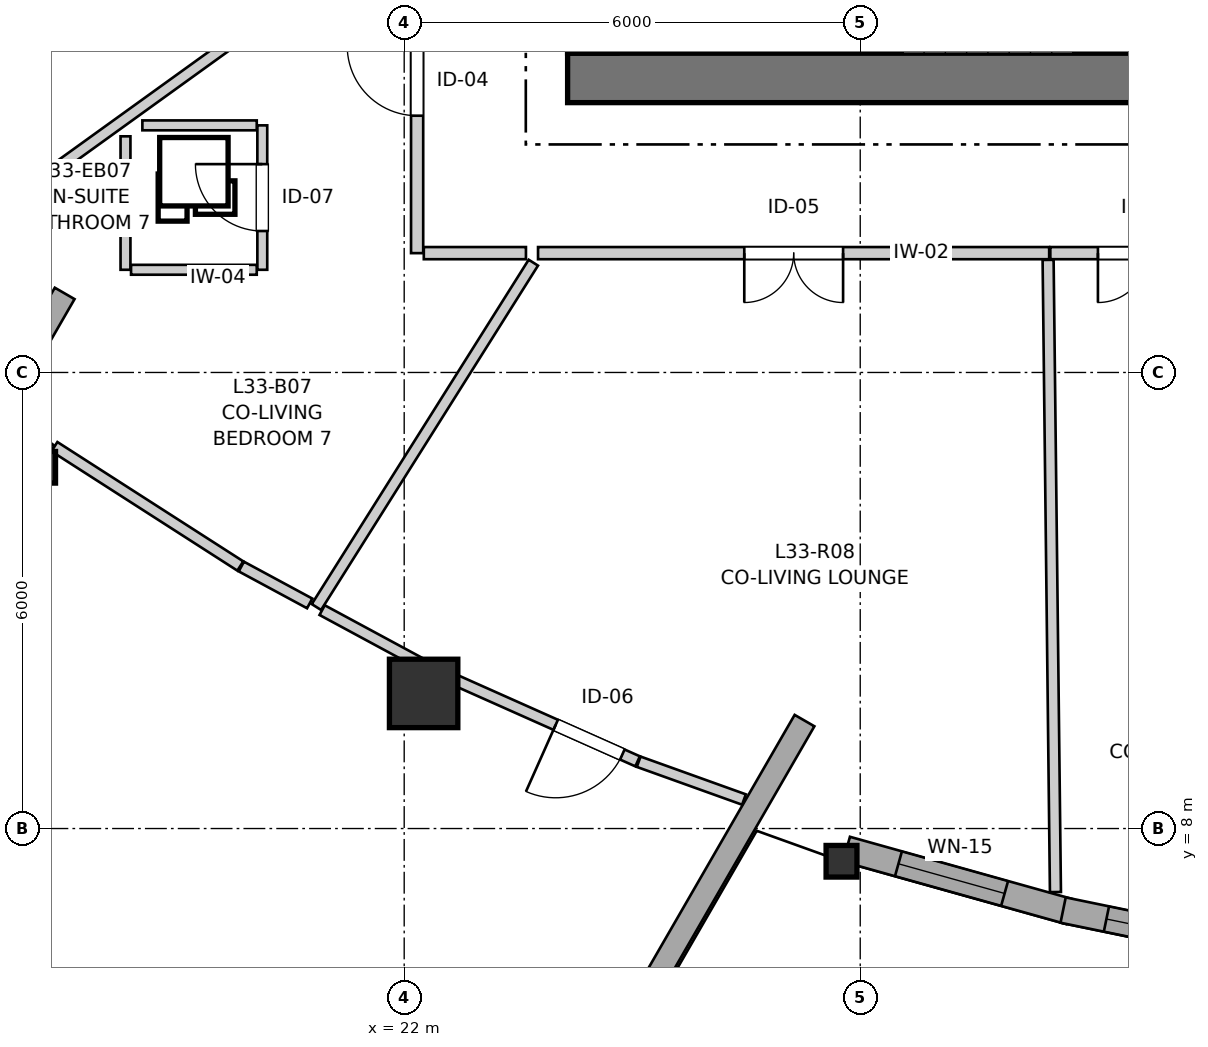
"""IFC4 building model, lengths in metres.
Left out: names, types, materials, properties, quantities, classifications, styles, units other than length and angle.
Written with IfcOpenShell. Run it as: python <this file> out.ifc"""

import sys

from ifc_helpers import new_model, si_unit, direction, frame, frame_2d, origin, origin_2d, place, context, subcontext, project, spatial, rectangle, i_section, extrude, source, transform, mapped, element, fill, save


model = new_model("IFC4")
c1 = context("Model", 3, precision=1e-05, world=origin(), true_north=direction((0.0, 1.0)))
c2 = subcontext(c1, "Body", "Model", "MODEL_VIEW")
j1 = project(units=[si_unit("LENGTHUNIT", "METRE"), si_unit("PLANEANGLEUNIT", "RADIAN")], contexts=[c1])
p1 = place(None, origin())
s1 = spatial("IfcSite", under=j1, at=p1, CompositionType="ELEMENT")
p2 = place(p1, origin())
s2 = spatial("IfcBuilding", under=s1, at=p2, CompositionType="ELEMENT")
p3 = place(p2, frame((0.0, 0.0, 112.0)))
s3 = spatial("IfcBuildingStorey", under=s2, at=p3, CompositionType="ELEMENT", Elevation=112.0)
p4 = place(p3, frame((24.15, 17.875, 0.0), z_axis=(0.0, 0.0, 1.0), x_axis=(1.0, 0.0, 0.0)))
e1 = element("IfcWall", 1, at=p4, inside=s3, PredefinedType="SHEAR", context=c2, shape_type="SweptSolid", body=[
    extrude(rectangle(XDim=12.4, YDim=0.65, at=frame_2d((6.2, 0.0))), origin(), (0.0, 0.0, 1.0), 2.935),
])
p5 = place(p3, frame((24.475, 33.8, 0.0), z_axis=(0.0, 0.0, 1.0), x_axis=(0.0, -1.0, 0.0)))
e2 = element("IfcWall", 2, at=p5, inside=s3, PredefinedType="SHEAR", context=c2, shape_type="SweptSolid", body=[
    extrude(rectangle(XDim=15.6, YDim=0.65, at=frame_2d((7.8, 0.0))), origin(), (0.0, 0.0, 1.0), 2.935),
])
p6 = place(p5, frame((7.05, 0.0, 0.0)))
e3 = element("IfcOpeningElement", 3, at=p6, cuts=e2, PredefinedType="OPENING", context=c2, shape_type="SweptSolid", body=[
    extrude(rectangle(XDim=1.5, YDim=2.15, at=frame_2d((0.75, 1.075))), frame((0.0, 0.335, 0.0), z_axis=(0.0, -1.0, 0.0), x_axis=(1.0, 0.0, 0.0)), (0.0, 0.0, 1.0), 0.67),
])
p7 = place(p5, frame((3.52, 0.0, 0.0)))
e4 = element("IfcOpeningElement", 4, at=p7, cuts=e2, PredefinedType="OPENING", context=c2, shape_type="SweptSolid", body=[
    extrude(rectangle(XDim=0.86, YDim=2.05, at=frame_2d((0.43, 1.025))), frame((0.0, 0.335, 0.0), z_axis=(0.0, -1.0, 0.0), x_axis=(1.0, 0.0, 0.0)), (0.0, 0.0, 1.0), 0.67),
])
p8 = place(p5, frame((11.22, 0.0, 0.0)))
e5 = element("IfcOpeningElement", 5, at=p8, cuts=e2, PredefinedType="OPENING", context=c2, shape_type="SweptSolid", body=[
    extrude(rectangle(XDim=0.86, YDim=2.05, at=frame_2d((0.43, 1.025))), frame((0.0, 0.335, 0.0), z_axis=(0.0, -1.0, 0.0), x_axis=(1.0, 0.0, 0.0)), (0.0, 0.0, 1.0), 0.67),
])
m1 = source(origin(), c2, "Body", "SweptSolid", [
    extrude(i_section(OverallWidth=0.406, OverallDepth=0.416, WebThickness=0.027, FlangeThickness=0.044, FilletRadius=0.015, at=origin_2d()), origin(), (0.0, 0.0, 1.0), 2.935),
])
p9 = place(p3, frame((17.209, 12.753, 0.0), z_axis=(0.0, 0.0, 1.0), x_axis=(1.0, 0.0, 0.0)))
e6 = element("IfcColumn", 6, at=p9, inside=s3, PredefinedType="PILASTER", context=c2, shape_type="MappedRepresentation", body=[
    mapped(m1, transform((0.0, 0.0, 0.0), x_axis=(1.0, 0.0, 0.0), y_axis=(0.0, 1.0, 0.0), z_axis=(0.0, 0.0, 1.0), scale=1.0)),
])
m2 = source(origin(), c2, "Body", "SweptSolid", [
    extrude(rectangle(XDim=0.9, YDim=0.9, at=origin_2d()), origin(), (0.0, 0.0, 1.0), 2.935),
])
p10 = place(p3, frame((22.256, 9.778, 0.0), z_axis=(0.0, 0.0, 1.0), x_axis=(1.0, 0.0, 0.0)))
e7 = element("IfcColumn", 7, at=p10, inside=s3, PredefinedType="COLUMN", context=c2, shape_type="MappedRepresentation", body=[
    mapped(m2, transform((0.0, 0.0, 0.0), x_axis=(1.0, 0.0, 0.0), y_axis=(0.0, 1.0, 0.0), z_axis=(0.0, 0.0, 1.0), scale=1.0)),
])
p11 = place(p3, frame((27.754, 7.569, 0.0), z_axis=(0.0, 0.0, 1.0), x_axis=(1.0, 0.0, 0.0)))
e8 = element("IfcColumn", 8, at=p11, inside=s3, PredefinedType="PILASTER", context=c2, shape_type="MappedRepresentation", body=[
    mapped(m1, transform((0.0, 0.0, 0.0), x_axis=(1.0, 0.0, 0.0), y_axis=(0.0, 1.0, 0.0), z_axis=(0.0, 0.0, 1.0), scale=1.0)),
])
p12 = place(p3, frame((14.928, 14.686, 0.0), z_axis=(0.0, 0.0, 1.0), x_axis=(0.798387010211, -0.602144651995, 0.0)))
e9 = element("IfcWall", 9, at=p12, inside=s3, PredefinedType="SOLIDWALL", context=c2, shape_type="SweptSolid", body=[
    extrude(rectangle(XDim=2.966, YDim=0.34, at=frame_2d((1.483, 0.0))), origin(), (0.0, 0.0, 1.0), 2.465),
])
p13 = place(p12, frame((0.891, 0.0, 0.82)))
e10 = element("IfcOpeningElement", 10, at=p13, cuts=e9, PredefinedType="OPENING", context=c2, shape_type="SweptSolid", body=[
    extrude(rectangle(XDim=0.58, YDim=1.35, at=frame_2d((0.29, 0.675))), frame((0.0, 0.18, 0.0), z_axis=(0.0, -1.0, 0.0), x_axis=(1.0, 0.0, 0.0)), (0.0, 0.0, 1.0), 0.36),
])
p14 = place(p3, frame((27.819, 7.728, 0.0), z_axis=(0.0, 0.0, 1.0), x_axis=(0.963032186905, -0.269386352632, 0.0)))
e11 = element("IfcWall", 11, at=p14, inside=s3, PredefinedType="SOLIDWALL", context=c2, shape_type="SweptSolid", body=[
    extrude(rectangle(XDim=3.049, YDim=0.34, at=frame_2d((1.524, 0.0))), origin(), (0.0, 0.0, 1.0), 2.465),
])
p15 = place(p14, frame((0.71, 0.0, 0.82)))
e12 = element("IfcOpeningElement", 12, at=p15, cuts=e11, PredefinedType="OPENING", context=c2, shape_type="SweptSolid", body=[
    extrude(rectangle(XDim=1.45, YDim=1.25, at=frame_2d((0.725, 0.625))), frame((0.0, 0.18, 0.0), z_axis=(0.0, -1.0, 0.0), x_axis=(1.0, 0.0, 0.0)), (0.0, 0.0, 1.0), 0.36),
])
p16 = place(p3, frame((30.67, 6.927, 0.0), z_axis=(0.0, 0.0, 1.0), x_axis=(0.979422345081, -0.201821381317, 0.0)))
e13 = element("IfcWall", 13, at=p16, inside=s3, PredefinedType="SOLIDWALL", context=c2, shape_type="SweptSolid", body=[
    extrude(rectangle(XDim=2.903, YDim=0.34, at=frame_2d((1.452, 0.0))), origin(), (0.0, 0.0, 1.0), 2.465),
])
p17 = place(p16, frame((0.582, 0.0, 0.82)))
e14 = element("IfcOpeningElement", 14, at=p17, cuts=e13, PredefinedType="OPENING", context=c2, shape_type="SweptSolid", body=[
    extrude(rectangle(XDim=1.75, YDim=1.3, at=frame_2d((0.875, 0.65))), frame((0.0, 0.18, 0.0), z_axis=(0.0, -1.0, 0.0), x_axis=(1.0, 0.0, 0.0)), (0.0, 0.0, 1.0), 0.36),
])
p18 = place(p3, frame((27.267, 9.42, 0.0), z_axis=(0.0, 0.0, 1.0), x_axis=(-0.500001212782, -0.866024703583, 0.0)))
e15 = element("IfcWall", 15, at=p18, inside=s3, PredefinedType="SOLIDWALL", context=c2, shape_type="SweptSolid", body=[
    extrude(rectangle(XDim=20.09, YDim=0.3, at=frame_2d((10.045, 0.0))), origin(), (0.0, 0.0, 1.0), 2.115),
])
p19 = place(p3, frame((17.533, 15.04, 0.0), z_axis=(0.0, 0.0, 1.0), x_axis=(-0.499995950774, -0.866027741594, 0.0)))
e16 = element("IfcWall", 16, at=p19, inside=s3, PredefinedType="SOLIDWALL", context=c2, shape_type="SweptSolid", body=[
    extrude(rectangle(XDim=20.091, YDim=0.3, at=frame_2d((10.045, 0.0))), origin(), (0.0, 0.0, 1.0), 2.115),
])
p20 = place(p3, frame((30.486, 15.57, 0.0), z_axis=(0.0, 0.0, 1.0), x_axis=(-1.0, 0.0, 0.0)))
e17 = element("IfcWall", 17, at=p20, inside=s3, PredefinedType="PARTITIONING", context=c2, shape_type="SweptSolid", body=[
    extrude(rectangle(XDim=6.725, YDim=0.16, at=frame_2d((3.363, 0.0))), origin(), (0.0, 0.0, 1.0), 2.935),
])
p21 = place(p20, frame((2.711, 0.0, 0.0)))
e18 = element("IfcOpeningElement", 18, at=p21, cuts=e17, PredefinedType="OPENING", context=c2, shape_type="SweptSolid", body=[
    extrude(rectangle(XDim=1.3, YDim=2.1, at=frame_2d((0.65, 1.05))), frame((0.0, 0.09, 0.0), z_axis=(0.0, -1.0, 0.0), x_axis=(1.0, 0.0, 0.0)), (0.0, 0.0, 1.0), 0.18),
])
p22 = place(p3, frame((22.17, 15.57, 0.0), z_axis=(0.0, 0.0, 1.0), x_axis=(0.0, 1.0, 0.0)))
e19 = element("IfcWall", 19, at=p22, inside=s3, PredefinedType="PARTITIONING", context=c2, shape_type="SweptSolid", body=[
    extrude(rectangle(XDim=4.555, YDim=0.16, at=frame_2d((2.277, 0.0))), origin(), (0.0, 0.0, 1.0), 2.935),
])
p23 = place(p22, frame((1.808, 0.0, 0.0)))
e20 = element("IfcOpeningElement", 20, at=p23, cuts=e19, PredefinedType="OPENING", context=c2, shape_type="SweptSolid", body=[
    extrude(rectangle(XDim=0.92, YDim=2.1, at=frame_2d((0.46, 1.05))), frame((0.0, 0.09, 0.0), z_axis=(0.0, -1.0, 0.0), x_axis=(1.0, 0.0, 0.0)), (0.0, 0.0, 1.0), 0.18),
])
p24 = place(p3, frame((25.071, 8.884, 0.0), z_axis=(0.0, 0.0, 1.0), x_axis=(-0.913404708383, 0.407052623997, 0.0)))
e21 = element("IfcWall", 21, at=p24, inside=s3, PredefinedType="PARTITIONING", context=c2, shape_type="SweptSolid", body=[
    extrude(rectangle(XDim=2.923, YDim=0.145, at=frame_2d((1.462, 0.0))), origin(), (0.0, 0.0, 1.0), 2.453),
])
p25 = place(p24, frame((0.22, 0.0, 0.0)))
e22 = element("IfcOpeningElement", 22, at=p25, cuts=e21, PredefinedType="OPENING", context=c2, shape_type="SweptSolid", body=[
    extrude(rectangle(XDim=0.96, YDim=2.1, at=frame_2d((0.48, 1.05))), frame((0.0, 0.083, 0.0), z_axis=(0.0, -1.0, 0.0), x_axis=(1.0, 0.0, 0.0)), (0.0, 0.0, 1.0), 0.165),
])
p26 = place(p3, frame((33.099, 15.57, 0.0), z_axis=(0.0, 0.0, 1.0), x_axis=(-1.0, 0.0, 0.0)))
e23 = element("IfcWall", 23, at=p26, inside=s3, PredefinedType="PARTITIONING", context=c2, shape_type="SweptSolid", body=[
    extrude(rectangle(XDim=2.598, YDim=0.16, at=frame_2d((1.299, 0.0))), origin(), (0.0, 0.0, 1.0), 2.935),
])
p27 = place(p26, frame((0.671, 0.0, 0.0)))
e24 = element("IfcOpeningElement", 24, at=p27, cuts=e23, PredefinedType="OPENING", context=c2, shape_type="SweptSolid", body=[
    extrude(rectangle(XDim=1.3, YDim=2.1, at=frame_2d((0.65, 1.05))), frame((0.0, 0.09, 0.0), z_axis=(0.0, -1.0, 0.0), x_axis=(1.0, 0.0, 0.0)), (0.0, 0.0, 1.0), 0.18),
])
p28 = place(p3, frame((20.133, 15.351, 0.0), z_axis=(0.0, 0.0, 1.0), x_axis=(0.0, 1.0, 0.0)))
e25 = element("IfcWall", 25, at=p28, inside=s3, PredefinedType="PARTITIONING", context=c2, shape_type="SweptSolid", body=[
    extrude(rectangle(XDim=1.9, YDim=0.13, at=frame_2d((0.95, 0.0))), origin(), (0.0, 0.0, 1.0), 2.935),
])
p29 = place(p28, frame((0.51, 0.0, 0.0)))
e26 = element("IfcOpeningElement", 26, at=p29, cuts=e25, PredefinedType="OPENING", context=c2, shape_type="SweptSolid", body=[
    extrude(rectangle(XDim=0.88, YDim=2.05, at=frame_2d((0.44, 1.025))), frame((0.0, 0.075, 0.0), z_axis=(0.0, -1.0, 0.0), x_axis=(1.0, 0.0, 0.0)), (0.0, 0.0, 1.0), 0.15),
])
p30 = place(p3, frame((14.966, 14.915, 0.0), z_axis=(0.0, 0.0, 1.0), x_axis=(0.811310715309, 0.584615192434, 0.0)))
e27 = element("IfcWall", 27, at=p30, inside=s3, PredefinedType="PARTITIONING", context=c2, shape_type="SweptSolid", body=[
    extrude(rectangle(XDim=8.72, YDim=0.145, at=frame_2d((4.36, 0.0))), origin(), (0.0, 0.0, 1.0), 2.103),
])
p31 = place(p3, frame((30.472, 15.481, 0.0), z_axis=(0.0, 0.0, 1.0), x_axis=(0.011623708307, -0.999932442421, 0.0)))
e28 = element("IfcWall", 28, at=p31, inside=s3, PredefinedType="PARTITIONING", context=c2, shape_type="SweptSolid", body=[
    extrude(rectangle(XDim=8.317, YDim=0.145, at=frame_2d((4.159, 0.0))), origin(), (0.0, 0.0, 1.0), 2.935),
])
p32 = place(p3, frame((20.845, 10.914, 0.0), z_axis=(0.0, 0.0, 1.0), x_axis=(0.533007953382, 0.846110230189, 0.0)))
e29 = element("IfcWall", 29, at=p32, inside=s3, PredefinedType="PARTITIONING", context=c2, shape_type="SweptSolid", body=[
    extrude(rectangle(XDim=5.354, YDim=0.145, at=frame_2d((2.677, 0.0))), origin(), (0.0, 0.0, 1.0), 2.935),
])
p33 = place(p3, frame((17.398, 13.024, 0.0), z_axis=(0.0, 0.0, 1.0), x_axis=(0.841590343852, -0.540116369994, 0.0)))
e30 = element("IfcWall", 30, at=p33, inside=s3, PredefinedType="PARTITIONING", context=c2, shape_type="SweptSolid", body=[
    extrude(rectangle(XDim=2.906, YDim=0.145, at=frame_2d((1.453, 0.0))), origin(), (0.0, 0.0, 1.0), 2.453),
])
p34 = place(p3, frame((18.333, 15.351, 0.0), z_axis=(0.0, 0.0, 1.0), x_axis=(0.0, 1.0, 0.0)))
e31 = element("IfcWall", 31, at=p34, inside=s3, PredefinedType="PARTITIONING", context=c2, shape_type="SweptSolid", body=[
    extrude(rectangle(XDim=1.756, YDim=0.13, at=frame_2d((0.878, 0.0))), origin(), (0.0, 0.0, 1.0), 2.935),
])
p35 = place(p3, frame((18.555, 17.251, 0.0), z_axis=(0.0, 0.0, 1.0), x_axis=(1.0, 0.0, 0.0)))
e32 = element("IfcWall", 32, at=p35, inside=s3, PredefinedType="PARTITIONING", context=c2, shape_type="SweptSolid", body=[
    extrude(rectangle(XDim=1.505, YDim=0.13, at=frame_2d((0.752, 0.0))), origin(), (0.0, 0.0, 1.0), 2.935),
])
p36 = place(p3, frame((18.406, 15.351, 0.0), z_axis=(0.0, 0.0, 1.0), x_axis=(1.0, 0.0, 0.0)))
e33 = element("IfcWall", 33, at=p36, inside=s3, PredefinedType="PARTITIONING", context=c2, shape_type="SweptSolid", body=[
    extrude(rectangle(XDim=1.654, YDim=0.13, at=frame_2d((0.827, 0.0))), origin(), (0.0, 0.0, 1.0), 2.935),
])
p37 = place(p3, frame((20.92, 10.873, 0.0), z_axis=(0.0, 0.0, 1.0), x_axis=(0.879929881444, -0.475103571595, 0.0)))
e34 = element("IfcWall", 34, at=p37, inside=s3, PredefinedType="PARTITIONING", context=c2, shape_type="SweptSolid", body=[
    extrude(rectangle(XDim=1.667, YDim=0.145, at=frame_2d((0.834, 0.0))), origin(), (0.0, 0.0, 1.0), 2.453),
])
p38 = place(p3, frame((22.258, 15.57, 0.0), z_axis=(0.0, 0.0, 1.0), x_axis=(1.0, 0.0, 0.0)))
e35 = element("IfcWall", 35, at=p38, inside=s3, PredefinedType="PARTITIONING", context=c2, shape_type="SweptSolid", body=[
    extrude(rectangle(XDim=1.344, YDim=0.16, at=frame_2d((0.672, 0.0))), origin(), (0.0, 0.0, 1.0), 2.935),
])
p39 = place(p3, frame((25.085, 8.879, 0.0), z_axis=(0.0, 0.0, 1.0), x_axis=(0.941166260093, -0.337943887151, 0.0)))
e36 = element("IfcWall", 36, at=p39, inside=s3, PredefinedType="PARTITIONING", context=c2, shape_type="SweptSolid", body=[
    extrude(rectangle(XDim=1.472, YDim=0.145, at=frame_2d((0.736, 0.0))), origin(), (0.0, 0.0, 1.0), 2.453),
])
p40 = place(p3, frame((19.857, 11.447, 0.0), z_axis=(0.0, 0.0, 1.0), x_axis=(0.8800411893, -0.474897362738, 0.0)))
e37 = element("IfcWall", 37, at=p40, inside=s3, PredefinedType="PARTITIONING", context=c2, shape_type="SweptSolid", body=[
    extrude(rectangle(XDim=1.022, YDim=0.145, at=frame_2d((0.511, 0.0))), origin(), (0.0, 0.0, 1.0), 2.453),
])
m3 = source(origin(), c2, "Body", "SweptSolid", [
    extrude(rectangle(XDim=1.45, YDim=1.25, at=frame_2d((0.725, 0.625))), frame((0.0, 0.03, 0.0), z_axis=(0.0, -1.0, 0.0), x_axis=(1.0, 0.0, 0.0)), (0.0, 0.0, 1.0), 0.06),
])
p41 = place(p15, origin())
e38 = element("IfcWindow", 38, at=p41, inside=s3, PartitioningType="SINGLE_PANEL", PredefinedType="WINDOW", context=c2, shape_type="MappedRepresentation", body=[
    mapped(m3, transform((0.0, 0.0, 0.0), x_axis=(1.0, 0.0, 0.0), y_axis=(0.0, 1.0, 0.0), z_axis=(0.0, 0.0, 1.0), scale=1.0)),
])
fill(e12, e38)
m4 = source(origin(), c2, "Body", "SweptSolid", [
    extrude(rectangle(XDim=1.75, YDim=1.3, at=frame_2d((0.875, 0.65))), frame((0.0, 0.03, 0.0), z_axis=(0.0, -1.0, 0.0), x_axis=(1.0, 0.0, 0.0)), (0.0, 0.0, 1.0), 0.06),
])
p42 = place(p17, origin())
e39 = element("IfcWindow", 39, at=p42, inside=s3, PartitioningType="SINGLE_PANEL", PredefinedType="WINDOW", context=c2, shape_type="MappedRepresentation", body=[
    mapped(m4, transform((0.0, 0.0, 0.0), x_axis=(1.0, 0.0, 0.0), y_axis=(0.0, 1.0, 0.0), z_axis=(0.0, 0.0, 1.0), scale=1.0)),
])
fill(e14, e39)
m5 = source(origin(), c2, "Body", "SweptSolid", [
    extrude(rectangle(XDim=1.3, YDim=2.1, at=frame_2d((0.65, 1.05))), frame((0.0, 0.025, 0.0), z_axis=(0.0, -1.0, 0.0), x_axis=(1.0, 0.0, 0.0)), (0.0, 0.0, 1.0), 0.05),
])
p43 = place(p21, origin())
e40 = element("IfcDoor", 40, at=p43, inside=s3, OperationType="DOUBLE_DOOR_SINGLE_SWING", PredefinedType="DOOR", context=c2, shape_type="MappedRepresentation", body=[
    mapped(m5, transform((0.0, 0.0, 0.0), x_axis=(1.0, 0.0, 0.0), y_axis=(0.0, 1.0, 0.0), z_axis=(0.0, 0.0, 1.0), scale=1.0)),
])
fill(e18, e40)
m6 = source(origin(), c2, "Body", "SweptSolid", [
    extrude(rectangle(XDim=0.92, YDim=2.1, at=frame_2d((0.46, 1.05))), frame((0.0, 0.025, 0.0), z_axis=(0.0, -1.0, 0.0), x_axis=(1.0, 0.0, 0.0)), (0.0, 0.0, 1.0), 0.05),
])
p44 = place(p23, origin())
e41 = element("IfcDoor", 41, at=p44, inside=s3, OperationType="SINGLE_SWING_RIGHT", PredefinedType="DOOR", context=c2, shape_type="MappedRepresentation", body=[
    mapped(m6, transform((0.0, 0.0, 0.0), x_axis=(1.0, 0.0, 0.0), y_axis=(0.0, 1.0, 0.0), z_axis=(0.0, 0.0, 1.0), scale=1.0)),
])
fill(e20, e41)
m7 = source(origin(), c2, "Body", "SweptSolid", [
    extrude(rectangle(XDim=0.96, YDim=2.1, at=frame_2d((0.48, 1.05))), frame((0.0, 0.025, 0.0), z_axis=(0.0, -1.0, 0.0), x_axis=(1.0, 0.0, 0.0)), (0.0, 0.0, 1.0), 0.05),
])
p45 = place(p25, origin())
e42 = element("IfcDoor", 42, at=p45, inside=s3, OperationType="SINGLE_SWING_RIGHT", PredefinedType="DOOR", context=c2, shape_type="MappedRepresentation", body=[
    mapped(m7, transform((0.0, 0.0, 0.0), x_axis=(1.0, 0.0, 0.0), y_axis=(0.0, 1.0, 0.0), z_axis=(0.0, 0.0, 1.0), scale=1.0)),
])
fill(e22, e42)
p46 = place(p27, origin())
e43 = element("IfcDoor", 43, at=p46, inside=s3, OperationType="DOUBLE_DOOR_SINGLE_SWING", PredefinedType="DOOR", context=c2, shape_type="MappedRepresentation", body=[
    mapped(m5, transform((0.0, 0.0, 0.0), x_axis=(1.0, 0.0, 0.0), y_axis=(0.0, 1.0, 0.0), z_axis=(0.0, 0.0, 1.0), scale=1.0)),
])
fill(e24, e43)
m8 = source(origin(), c2, "Body", "SweptSolid", [
    extrude(rectangle(XDim=0.88, YDim=2.05, at=frame_2d((0.44, 1.025))), frame((0.0, 0.025, 0.0), z_axis=(0.0, -1.0, 0.0), x_axis=(1.0, 0.0, 0.0)), (0.0, 0.0, 1.0), 0.05),
])
p47 = place(p29, origin())
e44 = element("IfcDoor", 44, at=p47, inside=s3, OperationType="SINGLE_SWING_RIGHT", PredefinedType="DOOR", context=c2, shape_type="MappedRepresentation", body=[
    mapped(m8, transform((0.0, 0.0, 0.0), x_axis=(1.0, 0.0, 0.0), y_axis=(0.0, 1.0, 0.0), z_axis=(0.0, 0.0, 1.0), scale=1.0)),
])
fill(e26, e44)
save(model, sys.argv[1])
